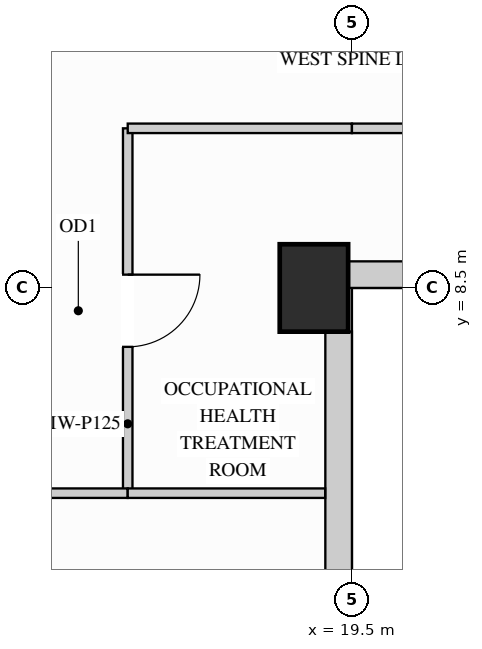
"""IFC4 building model, lengths in metres.
Left out: names, types, materials, properties, quantities, classifications, styles, units other than length and angle.
Written with IfcOpenShell. Run it as: python <this file> out.ifc"""

import sys

from ifc_helpers import new_model, si_unit, direction, frame, frame_2d, origin, origin_2d, place, context, subcontext, project, spatial, rectangle, extrude, source, transform, mapped, element, fill, save


model = new_model("IFC4")
c1 = context("Model", 3, precision=1e-05, world=origin(), true_north=direction((0.0, 1.0)))
c2 = subcontext(c1, "Body", "Model", "MODEL_VIEW")
j1 = project(units=[si_unit("LENGTHUNIT", "METRE"), si_unit("PLANEANGLEUNIT", "RADIAN")], contexts=[c1])
p1 = place(None, origin())
s1 = spatial("IfcSite", under=j1, at=p1, CompositionType="ELEMENT")
p2 = place(p1, origin())
s2 = spatial("IfcBuilding", under=s1, at=p2, CompositionType="ELEMENT")
p3 = place(p2, frame((0.0, 0.0, 91.8)))
s3 = spatial("IfcBuildingStorey", under=s2, at=p3, CompositionType="ELEMENT", Elevation=91.8)
m1 = source(origin(), c2, "Body", "SweptSolid", [
    extrude(rectangle(XDim=0.9, YDim=1.15, at=origin_2d()), origin(), (0.0, 0.0, 1.0), 3.38),
])
p4 = place(p3, frame((19.0, 8.5, 0.0), z_axis=(0.0, 0.0, 1.0), x_axis=(1.0, 0.0, 0.0)))
e1 = element("IfcColumn", 1, at=p4, inside=s3, PredefinedType="COLUMN", context=c2, shape_type="MappedRepresentation", body=[
    mapped(m1, transform((0.0, 0.0, 0.0), x_axis=(1.0, 0.0, 0.0), y_axis=(0.0, 1.0, 0.0), z_axis=(0.0, 0.0, 1.0))),
])
m2 = source(origin(), c2, "Body", "SweptSolid", [
    extrude(rectangle(XDim=3.854, YDim=0.35, at=frame_2d((1.927, 0.0))), origin(), (0.0, 0.0, 1.0), 2.519),
])
p5 = place(p3, frame((19.325, 4.073, 0.0), z_axis=(0.0, 0.0, 1.0), x_axis=(0.0, 1.0, 0.0)))
e2 = element("IfcWall", 2, at=p5, inside=s3, PredefinedType="SOLIDWALL", context=c2, shape_type="MappedRepresentation", body=[
    mapped(m2, transform((0.0, 0.0, 0.0), x_axis=(1.0, 0.0, 0.0), y_axis=(0.0, 1.0, 0.0), z_axis=(0.0, 0.0, 1.0))),
])
p6 = place(p3, frame((19.448, 8.675, 0.0), z_axis=(0.0, 0.0, 1.0), x_axis=(1.0, 0.0, 0.0)))
e3 = element("IfcWall", 3, at=p6, inside=s3, PredefinedType="SOLIDWALL", context=c2, shape_type="SweptSolid", body=[
    extrude(rectangle(XDim=3.504, YDim=0.35, at=frame_2d((1.752, 0.0))), origin(), (0.0, 0.0, 1.0), 3.365),
])
p7 = place(p6, frame((1.002, 0.0, 0.78)))
e4 = element("IfcOpeningElement", 4, at=p7, cuts=e3, PredefinedType="OPENING", context=c2, shape_type="SweptSolid", body=[
    extrude(rectangle(XDim=1.5, YDim=2.0, at=frame_2d((0.75, 1.0))), frame((0.0, 0.185, 0.0), z_axis=(0.0, -1.0, 0.0), x_axis=(1.0, 0.0, 0.0)), (0.0, 0.0, 1.0), 0.37),
])
p8 = place(p3, frame((16.55, 5.8, 0.0), z_axis=(0.0, 0.0, 1.0), x_axis=(0.0, 1.0, 0.0)))
e5 = element("IfcWall", 5, at=p8, inside=s3, PredefinedType="PARTITIONING", context=c2, shape_type="SweptSolid", body=[
    extrude(rectangle(XDim=4.8, YDim=0.125, at=frame_2d((2.4, 0.0))), origin(), (0.0, 0.0, 1.0), 3.365),
])
p9 = place(p8, frame((1.925, 0.0, 0.0)))
e6 = element("IfcOpeningElement", 6, at=p9, cuts=e5, PredefinedType="OPENING", context=c2, shape_type="SweptSolid", body=[
    extrude(rectangle(XDim=0.95, YDim=2.15, at=frame_2d((0.475, 1.075))), frame((0.0, 0.073, 0.0), z_axis=(0.0, -1.0, 0.0), x_axis=(1.0, 0.0, 0.0)), (0.0, 0.0, 1.0), 0.145),
])
m3 = source(origin(), c2, "Body", "SweptSolid", [
    extrude(rectangle(XDim=2.95, YDim=0.125, at=frame_2d((1.475, 0.0))), origin(), (0.0, 0.0, 1.0), 3.365),
])
p10 = place(p3, frame((16.55, 10.6, 0.0), z_axis=(0.0, 0.0, 1.0), x_axis=(1.0, 0.0, 0.0)))
e7 = element("IfcWall", 7, at=p10, inside=s3, PredefinedType="PARTITIONING", context=c2, shape_type="MappedRepresentation", body=[
    mapped(m3, transform((0.0, 0.0, 0.0), x_axis=(1.0, 0.0, 0.0), y_axis=(0.0, 1.0, 0.0), z_axis=(0.0, 0.0, 1.0))),
])
p11 = place(p3, frame((19.5, 10.6, 0.0), z_axis=(0.0, 0.0, 1.0), x_axis=(1.0, 0.0, 0.0)))
e8 = element("IfcWall", 8, at=p11, inside=s3, PredefinedType="PARTITIONING", context=c2, shape_type="SweptSolid", body=[
    extrude(rectangle(XDim=14.9, YDim=0.125, at=frame_2d((7.45, 0.0))), origin(), (0.0, 0.0, 1.0), 3.365),
])
p12 = place(p11, frame((6.975, 0.0, 0.0)))
e9 = element("IfcOpeningElement", 9, at=p12, cuts=e8, PredefinedType="OPENING", context=c2, shape_type="SweptSolid", body=[
    extrude(rectangle(XDim=0.95, YDim=2.15, at=frame_2d((0.475, 1.075))), frame((0.0, 0.073, 0.0), z_axis=(0.0, -1.0, 0.0), x_axis=(1.0, 0.0, 0.0)), (0.0, 0.0, 1.0), 0.145),
])
p13 = place(p3, frame((9.882, 5.8, 0.0), z_axis=(0.0, 0.0, 1.0), x_axis=(1.0, 0.0, 0.0)))
e10 = element("IfcWall", 10, at=p13, inside=s3, PredefinedType="PARTITIONING", context=c2, shape_type="SweptSolid", body=[
    extrude(rectangle(XDim=6.668, YDim=0.125, at=frame_2d((3.334, 0.0))), origin(), (0.0, 0.0, 1.0), 3.365),
])
p14 = place(p13, frame((2.859, 0.0, 0.0)))
e11 = element("IfcOpeningElement", 11, at=p14, cuts=e10, PredefinedType="OPENING", context=c2, shape_type="SweptSolid", body=[
    extrude(rectangle(XDim=0.95, YDim=2.15, at=frame_2d((0.475, 1.075))), frame((0.0, 0.073, 0.0), z_axis=(0.0, -1.0, 0.0), x_axis=(1.0, 0.0, 0.0)), (0.0, 0.0, 1.0), 0.145),
])
m4 = source(origin(), c2, "Body", "SweptSolid", [
    extrude(rectangle(XDim=2.598, YDim=0.125, at=frame_2d((1.299, 0.0))), origin(), (0.0, 0.0, 1.0), 3.365),
])
p15 = place(p3, frame((16.55, 5.8, 0.0), z_axis=(0.0, 0.0, 1.0), x_axis=(1.0, 0.0, 0.0)))
e12 = element("IfcWall", 12, at=p15, inside=s3, PredefinedType="PARTITIONING", context=c2, shape_type="MappedRepresentation", body=[
    mapped(m4, transform((0.0, 0.0, 0.0), x_axis=(1.0, 0.0, 0.0), y_axis=(0.0, 1.0, 0.0), z_axis=(0.0, 0.0, 1.0))),
])
m5 = source(origin(), c2, "Body", "SweptSolid", [
    extrude(rectangle(XDim=0.95, YDim=2.15, at=frame_2d((0.475, 1.075))), frame((0.0, 0.025, 0.0), z_axis=(0.0, -1.0, 0.0), x_axis=(1.0, 0.0, 0.0)), (0.0, 0.0, 1.0), 0.05),
])
p16 = place(p9, origin())
e13 = element("IfcDoor", 13, at=p16, inside=s3, OperationType="SINGLE_SWING_RIGHT", PredefinedType="DOOR", context=c2, shape_type="MappedRepresentation", body=[
    mapped(m5, transform((0.0, 0.0, 0.0), x_axis=(1.0, 0.0, 0.0), y_axis=(0.0, 1.0, 0.0), z_axis=(0.0, 0.0, 1.0))),
])
fill(e6, e13)
save(model, sys.argv[1])
